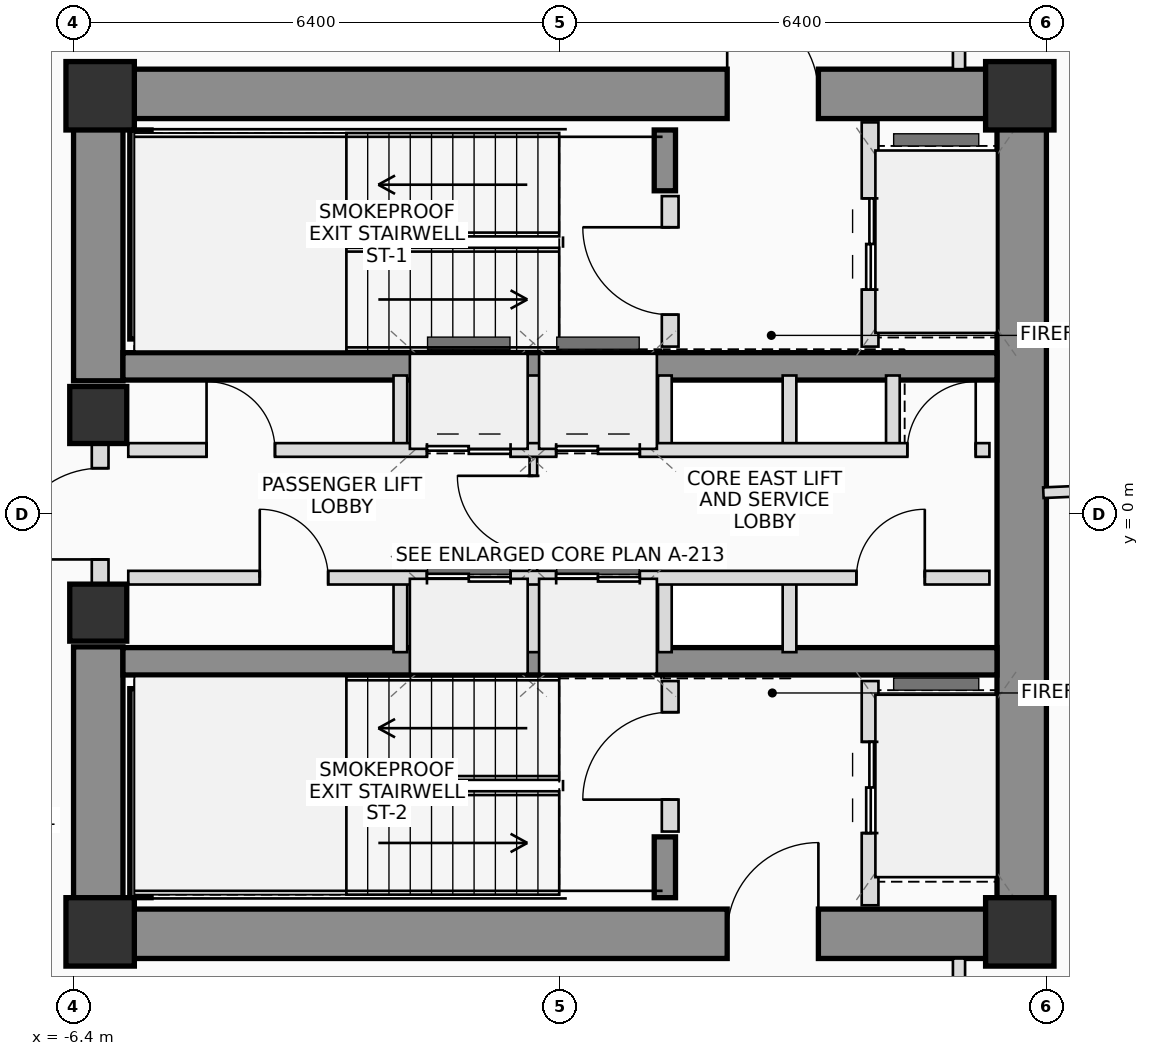
"""IFC4 building model, lengths in metres.
Left out: names, types, materials, properties, quantities, classifications, styles, units other than length and angle.
Written with IfcOpenShell. Run it as: python <this file> out.ifc"""

import sys

from ifc_helpers import new_model, si_unit, direction, frame, frame_2d, origin, origin_2d, place, context, subcontext, project, spatial, rectangle, extrude, source, transform, mapped, element, fill, save


model = new_model("IFC4")
c1 = context("Model", 3, precision=1e-05, world=origin(), true_north=direction((0.0, 1.0)))
c2 = subcontext(c1, "Body", "Model", "MODEL_VIEW")
j1 = project(units=[si_unit("LENGTHUNIT", "METRE"), si_unit("PLANEANGLEUNIT", "RADIAN")], contexts=[c1])
p1 = place(None, origin())
s1 = spatial("IfcSite", under=j1, at=p1, CompositionType="ELEMENT")
p2 = place(p1, origin())
s2 = spatial("IfcBuilding", under=s1, at=p2, CompositionType="ELEMENT")
p3 = place(p2, frame((0.0, 0.0, 139.85)))
s3 = spatial("IfcBuildingStorey", under=s2, at=p3, CompositionType="ELEMENT", Elevation=139.85)
m1 = source(origin(), c2, "Body", "SweptSolid", [
    extrude(rectangle(XDim=0.9, YDim=0.9, at=origin_2d()), origin(), (0.0, 0.0, 1.0), 3.45),
])
for number, where, z_axis, x_axis in (
    (1, (-6.05, -5.5, 0.0), (0.0, 0.0, 1.0), (1.0, 0.0, 0.0)),
    (2, (6.05, -5.5, 0.0), (0.0, 0.0, 1.0), (1.0, 0.0, 0.0)),
    (3, (6.05, 5.5, 0.0), (0.0, 0.0, 1.0), (1.0, 0.0, 0.0)),
    (4, (-6.05, 5.5, 0.0), (0.0, 0.0, 1.0), (1.0, 0.0, 0.0)),
):
    element("IfcColumn", number, at=place(p3, frame(where, z_axis=z_axis, x_axis=x_axis)), inside=s3, PredefinedType="COLUMN", context=c2, shape_type="MappedRepresentation", body=[
        mapped(m1, transform((0.0, 0.0, 0.0), scale=1.0)),
    ])
p4 = place(p3, frame((-6.4, 5.525, 0.0), z_axis=(0.0, 0.0, 1.0), x_axis=(1.0, 0.0, 0.0)))
e5 = element("IfcWall", 5, at=p4, inside=s3, PredefinedType="SHEAR", context=c2, shape_type="SweptSolid", body=[
    extrude(rectangle(XDim=12.8, YDim=0.65, at=frame_2d((6.4, 0.0))), origin(), (0.0, 0.0, 1.0), 3.45),
])
p5 = place(p4, frame((8.6, 0.0, 0.0)))
e6 = element("IfcOpeningElement", 6, at=p5, cuts=e5, PredefinedType="OPENING", context=c2, shape_type="SweptSolid", body=[
    extrude(rectangle(XDim=1.2, YDim=2.2, at=frame_2d((0.6, 1.1))), frame((0.0, 0.335, 0.0), z_axis=(0.0, -1.0, 0.0), x_axis=(1.0, 0.0, 0.0)), (0.0, 0.0, 1.0), 0.67),
])
p6 = place(p3, frame((-6.4, -5.525, 0.0), z_axis=(0.0, 0.0, 1.0), x_axis=(1.0, 0.0, 0.0)))
e7 = element("IfcWall", 7, at=p6, inside=s3, PredefinedType="SHEAR", context=c2, shape_type="SweptSolid", body=[
    extrude(rectangle(XDim=12.8, YDim=0.65, at=frame_2d((6.4, 0.0))), origin(), (0.0, 0.0, 1.0), 3.45),
])
p7 = place(p6, frame((8.6, 0.0, 0.0)))
e8 = element("IfcOpeningElement", 8, at=p7, cuts=e7, PredefinedType="OPENING", context=c2, shape_type="SweptSolid", body=[
    extrude(rectangle(XDim=1.2, YDim=2.2, at=frame_2d((0.6, 1.1))), frame((0.0, 0.335, 0.0), z_axis=(0.0, -1.0, 0.0), x_axis=(1.0, 0.0, 0.0)), (0.0, 0.0, 1.0), 0.67),
])
p8 = place(p3, frame((6.075, -5.2, 0.0), z_axis=(0.0, 0.0, 1.0), x_axis=(0.0, 1.0, 0.0)))
e9 = element("IfcWall", 9, at=p8, inside=s3, PredefinedType="SHEAR", context=c2, shape_type="SweptSolid", body=[
    extrude(rectangle(XDim=10.4, YDim=0.65, at=frame_2d((5.2, 0.0))), origin(), (0.0, 0.0, 1.0), 3.45),
])
for number, where, z_axis, x_axis in (
    (10, (-6.075, -5.2, 0.0), (0.0, 0.0, 1.0), (0.0, 1.0, 0.0)),
    (11, (-6.075, 1.75, 0.0), (0.0, 0.0, 1.0), (0.0, 1.0, 0.0)),
):
    element("IfcWall", number, at=place(p3, frame(where, z_axis=z_axis, x_axis=x_axis)), inside=s3, PredefinedType="SHEAR", context=c2, shape_type="SweptSolid", body=[
        extrude(rectangle(XDim=3.45, YDim=0.65, at=frame_2d((1.725, 0.0))), origin(), (0.0, 0.0, 1.0), 3.45),
    ])
for number, where, z_axis, x_axis in (
    (12, (-5.75, 1.94, 0.0), (0.0, 0.0, 1.0), (1.0, 0.0, 0.0)),
    (13, (-5.75, -1.94, 0.0), (0.0, 0.0, 1.0), (1.0, 0.0, 0.0)),
):
    element("IfcWall", number, at=place(p3, frame(where, z_axis=z_axis, x_axis=x_axis)), inside=s3, PredefinedType="SHEAR", context=c2, shape_type="SweptSolid", body=[
        extrude(rectangle(XDim=11.5, YDim=0.36, at=frame_2d((5.75, 0.0))), origin(), (0.0, 0.0, 1.0), 3.45),
    ])
p9 = place(p3, frame((-5.52, 2.3, 0.0), z_axis=(0.0, 0.0, 1.0), x_axis=(0.0, 1.0, 0.0)))
e14 = element("IfcWall", 14, at=p9, inside=s3, PredefinedType="SHEAR", context=c2, shape_type="SweptSolid", body=[
    extrude(rectangle(XDim=2.75, YDim=0.28, at=frame_2d((1.375, 0.0))), origin(), (0.0, 0.0, 1.0), 3.45),
])
p10 = place(p3, frame((1.38, 4.25, 0.0), z_axis=(0.0, 0.0, 1.0), x_axis=(0.0, 1.0, 0.0)))
e15 = element("IfcWall", 15, at=p10, inside=s3, PredefinedType="SHEAR", context=c2, shape_type="SweptSolid", body=[
    extrude(rectangle(XDim=0.8, YDim=0.28, at=frame_2d((0.4, 0.0))), origin(), (0.0, 0.0, 1.0), 3.45),
])
p11 = place(p3, frame((-5.52, -5.05, 0.0), z_axis=(0.0, 0.0, 1.0), x_axis=(0.0, 1.0, 0.0)))
e16 = element("IfcWall", 16, at=p11, inside=s3, PredefinedType="SHEAR", context=c2, shape_type="SweptSolid", body=[
    extrude(rectangle(XDim=2.75, YDim=0.28, at=frame_2d((1.375, 0.0))), origin(), (0.0, 0.0, 1.0), 3.45),
])
p12 = place(p3, frame((1.38, -5.05, 0.0), z_axis=(0.0, 0.0, 1.0), x_axis=(0.0, 1.0, 0.0)))
e17 = element("IfcWall", 17, at=p12, inside=s3, PredefinedType="SHEAR", context=c2, shape_type="SweptSolid", body=[
    extrude(rectangle(XDim=0.8, YDim=0.28, at=frame_2d((0.4, 0.0))), origin(), (0.0, 0.0, 1.0), 3.45),
])
m2 = source(origin(), c2, "Body", "SweptSolid", [
    extrude(rectangle(XDim=0.75, YDim=0.75, at=origin_2d()), origin(), (0.0, 0.0, 1.0), 3.45),
])
for number, where, z_axis, x_axis in (
    (18, (-6.075, -1.3, 0.0), (0.0, 0.0, 1.0), (1.0, 0.0, 0.0)),
    (19, (-6.075, 1.3, 0.0), (0.0, 0.0, 1.0), (1.0, 0.0, 0.0)),
):
    element("IfcColumn", number, at=place(p3, frame(where, z_axis=z_axis, x_axis=x_axis)), inside=s3, PredefinedType="COLUMN", context=c2, shape_type="MappedRepresentation", body=[
        mapped(m2, transform((0.0, 0.0, 0.0), scale=1.0)),
    ])
p13 = place(p3, frame((-6.05, -0.95, 0.0), z_axis=(0.0, 0.0, 1.0), x_axis=(0.0, 1.0, 0.0)))
e20 = element("IfcWall", 20, at=p13, inside=s3, PredefinedType="PLUMBINGWALL", context=c2, shape_type="SweptSolid", body=[
    extrude(rectangle(XDim=1.9, YDim=0.22, at=frame_2d((0.95, 0.0))), origin(), (0.0, 0.0, 1.0), 2.23),
])
p14 = place(p13, frame((0.35, 0.0, 0.0)))
e21 = element("IfcOpeningElement", 21, at=p14, cuts=e20, PredefinedType="OPENING", context=c2, shape_type="SweptSolid", body=[
    extrude(rectangle(XDim=1.2, YDim=2.2, at=frame_2d((0.6, 1.1))), frame((0.0, 0.12, 0.0), z_axis=(0.0, -1.0, 0.0), x_axis=(1.0, 0.0, 0.0)), (0.0, 0.0, 1.0), 0.24),
])
p15 = place(p3, frame((1.45, 2.2, 0.0), z_axis=(0.0, 0.0, 1.0), x_axis=(0.0, 1.0, 0.0)))
e22 = element("IfcWall", 22, at=p15, inside=s3, PredefinedType="PLUMBINGWALL", context=c2, shape_type="SweptSolid", body=[
    extrude(rectangle(XDim=1.98, YDim=0.22, at=frame_2d((0.99, 0.0))), origin(), (0.0, 0.0, 1.0), 3.25),
])
p16 = place(p15, frame((0.42, 0.0, 0.0)))
e23 = element("IfcOpeningElement", 23, at=p16, cuts=e22, PredefinedType="OPENING", context=c2, shape_type="SweptSolid", body=[
    extrude(rectangle(XDim=1.15, YDim=2.15, at=frame_2d((0.575, 1.075))), frame((0.0, 0.12, 0.0), z_axis=(0.0, -1.0, 0.0), x_axis=(1.0, 0.0, 0.0)), (0.0, 0.0, 1.0), 0.24),
])
p17 = place(p3, frame((4.08, 2.2, 0.0), z_axis=(0.0, 0.0, 1.0), x_axis=(0.0, 1.0, 0.0)))
e24 = element("IfcWall", 24, at=p17, inside=s3, PredefinedType="PLUMBINGWALL", context=c2, shape_type="SweptSolid", body=[
    extrude(rectangle(XDim=2.95, YDim=0.22, at=frame_2d((1.475, 0.0))), origin(), (0.0, 0.0, 1.0), 3.25),
])
p18 = place(p17, frame((0.75, 0.0, 0.0)))
e25 = element("IfcOpeningElement", 25, at=p18, cuts=e24, PredefinedType="OPENING", context=c2, shape_type="SweptSolid", body=[
    extrude(rectangle(XDim=1.2, YDim=2.25, at=frame_2d((0.6, 1.125))), frame((0.0, 0.12, 0.0), z_axis=(0.0, -1.0, 0.0), x_axis=(1.0, 0.0, 0.0)), (0.0, 0.0, 1.0), 0.24),
])
p19 = place(p3, frame((1.45, -4.18, 0.0), z_axis=(0.0, 0.0, 1.0), x_axis=(0.0, 1.0, 0.0)))
e26 = element("IfcWall", 26, at=p19, inside=s3, PredefinedType="PLUMBINGWALL", context=c2, shape_type="SweptSolid", body=[
    extrude(rectangle(XDim=1.98, YDim=0.22, at=frame_2d((0.99, 0.0))), origin(), (0.0, 0.0, 1.0), 3.25),
])
p20 = place(p19, frame((0.42, 0.0, 0.0)))
e27 = element("IfcOpeningElement", 27, at=p20, cuts=e26, PredefinedType="OPENING", context=c2, shape_type="SweptSolid", body=[
    extrude(rectangle(XDim=1.15, YDim=2.15, at=frame_2d((0.575, 1.075))), frame((0.0, 0.12, 0.0), z_axis=(0.0, -1.0, 0.0), x_axis=(1.0, 0.0, 0.0)), (0.0, 0.0, 1.0), 0.24),
])
p21 = place(p3, frame((4.08, -5.15, 0.0), z_axis=(0.0, 0.0, 1.0), x_axis=(0.0, 1.0, 0.0)))
e28 = element("IfcWall", 28, at=p21, inside=s3, PredefinedType="PLUMBINGWALL", context=c2, shape_type="SweptSolid", body=[
    extrude(rectangle(XDim=2.95, YDim=0.22, at=frame_2d((1.475, 0.0))), origin(), (0.0, 0.0, 1.0), 3.25),
])
p22 = place(p21, frame((0.95, 0.0, 0.0)))
e29 = element("IfcOpeningElement", 29, at=p22, cuts=e28, PredefinedType="OPENING", context=c2, shape_type="SweptSolid", body=[
    extrude(rectangle(XDim=1.2, YDim=2.25, at=frame_2d((0.6, 1.125))), frame((0.0, 0.12, 0.0), z_axis=(0.0, -1.0, 0.0), x_axis=(1.0, 0.0, 0.0)), (0.0, 0.0, 1.0), 0.24),
])
p23 = place(p3, frame((-0.35, -0.84, 0.0), z_axis=(0.0, 0.0, 1.0), x_axis=(0.0, 1.0, 0.0)))
e30 = element("IfcWall", 30, at=p23, inside=s3, PredefinedType="PARTITIONING", context=c2, shape_type="SweptSolid", body=[
    extrude(rectangle(XDim=1.68, YDim=0.1, at=frame_2d((0.84, 0.0))), origin(), (0.0, 0.0, 1.0), 3.25),
])
p24 = place(p23, frame((0.34, 0.0, 0.0)))
e31 = element("IfcOpeningElement", 31, at=p24, cuts=e30, PredefinedType="OPENING", context=c2, shape_type="SweptSolid", body=[
    extrude(rectangle(XDim=1.0, YDim=2.25, at=frame_2d((0.5, 1.125))), frame((0.0, 0.06, 0.0), z_axis=(0.0, -1.0, 0.0), x_axis=(1.0, 0.0, 0.0)), (0.0, 0.0, 1.0), 0.12),
])
for number, where, z_axis, x_axis in (
    (32, (-2.1, 0.84, 0.0), (0.0, 0.0, 1.0), (0.0, 1.0, 0.0)),
    (33, (-2.1, -1.82, 0.0), (0.0, 0.0, 1.0), (0.0, 1.0, 0.0)),
    (34, (-0.35, 0.84, 0.0), (0.0, 0.0, 1.0), (0.0, 1.0, 0.0)),
    (35, (-0.35, -1.82, 0.0), (0.0, 0.0, 1.0), (0.0, 1.0, 0.0)),
    (36, (1.38, 0.84, 0.0), (0.0, 0.0, 1.0), (0.0, 1.0, 0.0)),
    (37, (1.38, -1.82, 0.0), (0.0, 0.0, 1.0), (0.0, 1.0, 0.0)),
    (38, (3.02, 0.84, 0.0), (0.0, 0.0, 1.0), (0.0, 1.0, 0.0)),
    (39, (4.38, 0.84, 0.0), (0.0, 0.0, 1.0), (0.0, 1.0, 0.0)),
    (40, (3.02, -1.82, 0.0), (0.0, 0.0, 1.0), (0.0, 1.0, 0.0)),
):
    element("IfcWall", number, at=place(p3, frame(where, z_axis=z_axis, x_axis=x_axis)), inside=s3, PredefinedType="PLUMBINGWALL", context=c2, shape_type="SweptSolid", body=[
        extrude(rectangle(XDim=0.98, YDim=0.18, at=frame_2d((0.49, 0.0))), origin(), (0.0, 0.0, 1.0), 3.25),
    ])
p25 = place(p3, frame((-5.68, 0.84, 0.0), z_axis=(0.0, 0.0, 1.0), x_axis=(1.0, 0.0, 0.0)))
e41 = element("IfcWall", 41, at=p25, inside=s3, PredefinedType="PLUMBINGWALL", context=c2, shape_type="SweptSolid", body=[
    extrude(rectangle(XDim=11.33, YDim=0.18, at=frame_2d((5.665, 0.0))), origin(), (0.0, 0.0, 1.0), 3.25),
])
p26 = place(p25, frame((1.03, 0.0, 0.0)))
e42 = element("IfcOpeningElement", 42, at=p26, cuts=e41, PredefinedType="OPENING", context=c2, shape_type="SweptSolid", body=[
    extrude(rectangle(XDim=0.9, YDim=2.05, at=frame_2d((0.45, 1.025))), frame((0.0, 0.1, 0.0), z_axis=(0.0, -1.0, 0.0), x_axis=(1.0, 0.0, 0.0)), (0.0, 0.0, 1.0), 0.2),
])
p27 = place(p25, frame((3.93, 0.0, 0.0)))
e43 = element("IfcOpeningElement", 43, at=p27, cuts=e41, PredefinedType="OPENING", context=c2, shape_type="SweptSolid", body=[
    extrude(rectangle(XDim=1.1, YDim=2.2, at=frame_2d((0.55, 1.1))), frame((0.0, 0.1, 0.0), z_axis=(0.0, -1.0, 0.0), x_axis=(1.0, 0.0, 0.0)), (0.0, 0.0, 1.0), 0.2),
])
p28 = place(p25, frame((5.63, 0.0, 0.0)))
e44 = element("IfcOpeningElement", 44, at=p28, cuts=e41, PredefinedType="OPENING", context=c2, shape_type="SweptSolid", body=[
    extrude(rectangle(XDim=1.1, YDim=2.2, at=frame_2d((0.55, 1.1))), frame((0.0, 0.1, 0.0), z_axis=(0.0, -1.0, 0.0), x_axis=(1.0, 0.0, 0.0)), (0.0, 0.0, 1.0), 0.2),
])
p29 = place(p25, frame((10.25, 0.0, 0.0)))
e45 = element("IfcOpeningElement", 45, at=p29, cuts=e41, PredefinedType="OPENING", context=c2, shape_type="SweptSolid", body=[
    extrude(rectangle(XDim=0.9, YDim=2.05, at=frame_2d((0.45, 1.025))), frame((0.0, 0.1, 0.0), z_axis=(0.0, -1.0, 0.0), x_axis=(1.0, 0.0, 0.0)), (0.0, 0.0, 1.0), 0.2),
])
p30 = place(p3, frame((-5.68, -0.84, 0.0), z_axis=(0.0, 0.0, 1.0), x_axis=(1.0, 0.0, 0.0)))
e46 = element("IfcWall", 46, at=p30, inside=s3, PredefinedType="PLUMBINGWALL", context=c2, shape_type="SweptSolid", body=[
    extrude(rectangle(XDim=11.33, YDim=0.18, at=frame_2d((5.665, 0.0))), origin(), (0.0, 0.0, 1.0), 3.25),
])
p31 = place(p30, frame((1.73, 0.0, 0.0)))
e47 = element("IfcOpeningElement", 47, at=p31, cuts=e46, PredefinedType="OPENING", context=c2, shape_type="SweptSolid", body=[
    extrude(rectangle(XDim=0.9, YDim=2.05, at=frame_2d((0.45, 1.025))), frame((0.0, 0.1, 0.0), z_axis=(0.0, -1.0, 0.0), x_axis=(1.0, 0.0, 0.0)), (0.0, 0.0, 1.0), 0.2),
])
p32 = place(p30, frame((3.93, 0.0, 0.0)))
e48 = element("IfcOpeningElement", 48, at=p32, cuts=e46, PredefinedType="OPENING", context=c2, shape_type="SweptSolid", body=[
    extrude(rectangle(XDim=1.1, YDim=2.2, at=frame_2d((0.55, 1.1))), frame((0.0, 0.1, 0.0), z_axis=(0.0, -1.0, 0.0), x_axis=(1.0, 0.0, 0.0)), (0.0, 0.0, 1.0), 0.2),
])
p33 = place(p30, frame((5.63, 0.0, 0.0)))
e49 = element("IfcOpeningElement", 49, at=p33, cuts=e46, PredefinedType="OPENING", context=c2, shape_type="SweptSolid", body=[
    extrude(rectangle(XDim=1.1, YDim=2.2, at=frame_2d((0.55, 1.1))), frame((0.0, 0.1, 0.0), z_axis=(0.0, -1.0, 0.0), x_axis=(1.0, 0.0, 0.0)), (0.0, 0.0, 1.0), 0.2),
])
p34 = place(p30, frame((9.58, 0.0, 0.0)))
e50 = element("IfcOpeningElement", 50, at=p34, cuts=e46, PredefinedType="OPENING", context=c2, shape_type="SweptSolid", body=[
    extrude(rectangle(XDim=0.9, YDim=2.05, at=frame_2d((0.45, 1.025))), frame((0.0, 0.1, 0.0), z_axis=(0.0, -1.0, 0.0), x_axis=(1.0, 0.0, 0.0)), (0.0, 0.0, 1.0), 0.2),
])
p35 = place(p3, frame((5.25, 7.6, 0.0), z_axis=(0.0, 0.0, 1.0), x_axis=(0.0, -1.0, 0.0)))
e51 = element("IfcWall", 51, at=p35, inside=s3, PredefinedType="PARTITIONING", context=c2, shape_type="SweptSolid", body=[
    extrude(rectangle(XDim=1.75, YDim=0.16, at=frame_2d((0.875, 0.0))), origin(), (0.0, 0.0, 1.0), 2.605),
])
p36 = place(p3, frame((5.25, -5.85, 0.0), z_axis=(0.0, 0.0, 1.0), x_axis=(0.0, -1.0, 0.0)))
e52 = element("IfcWall", 52, at=p36, inside=s3, PredefinedType="PARTITIONING", context=c2, shape_type="SweptSolid", body=[
    extrude(rectangle(XDim=1.75, YDim=0.16, at=frame_2d((0.875, 0.0))), origin(), (0.0, 0.0, 1.0), 3.25),
])
p37 = place(p3, frame((6.36, 0.278, 0.0), z_axis=(0.0, 0.0, 1.0), x_axis=(0.999047913846, 0.043626435113, 0.0)))
e53 = element("IfcWall", 53, at=p37, inside=s3, PredefinedType="PARTITIONING", context=c2, shape_type="SweptSolid", body=[
    extrude(rectangle(XDim=9.575, YDim=0.14, at=frame_2d((4.788, 0.0))), origin(), (0.0, 0.0, 1.0), 2.605),
])
p38 = place(p5, origin())
e54 = element("IfcDoor", 54, at=p38, inside=s3, OperationType="SINGLE_SWING_LEFT", PredefinedType="DOOR", context=c2, shape_type="SweptSolid", body=[
    extrude(rectangle(XDim=1.2, YDim=2.2, at=frame_2d((0.6, 1.1))), frame((0.0, 0.025, 0.0), z_axis=(0.0, -1.0, 0.0), x_axis=(1.0, 0.0, 0.0)), (0.0, 0.0, 1.0), 0.05),
])
fill(e6, e54)
p39 = place(p7, origin())
e55 = element("IfcDoor", 55, at=p39, inside=s3, OperationType="SINGLE_SWING_RIGHT", PredefinedType="DOOR", context=c2, shape_type="SweptSolid", body=[
    extrude(rectangle(XDim=1.2, YDim=2.2, at=frame_2d((0.6, 1.1))), frame((0.0, 0.025, 0.0), z_axis=(0.0, -1.0, 0.0), x_axis=(1.0, 0.0, 0.0)), (0.0, 0.0, 1.0), 0.05),
])
fill(e8, e55)
p40 = place(p14, origin())
e56 = element("IfcDoor", 56, at=p40, inside=s3, OperationType="SINGLE_SWING_LEFT", PredefinedType="DOOR", context=c2, shape_type="SweptSolid", body=[
    extrude(rectangle(XDim=1.2, YDim=2.2, at=frame_2d((0.6, 1.1))), frame((0.0, 0.025, 0.0), z_axis=(0.0, -1.0, 0.0), x_axis=(1.0, 0.0, 0.0)), (0.0, 0.0, 1.0), 0.05),
])
fill(e21, e56)
p41 = place(p16, origin())
e57 = element("IfcDoor", 57, at=p41, inside=s3, OperationType="SINGLE_SWING_RIGHT", PredefinedType="DOOR", context=c2, shape_type="SweptSolid", body=[
    extrude(rectangle(XDim=1.15, YDim=2.15, at=frame_2d((0.575, 1.075))), frame((0.0, 0.025, 0.0), z_axis=(0.0, -1.0, 0.0), x_axis=(1.0, 0.0, 0.0)), (0.0, 0.0, 1.0), 0.05),
])
fill(e23, e57)
p42 = place(p18, origin())
e58 = element("IfcDoor", 58, at=p42, inside=s3, OperationType="DOUBLE_DOOR_SLIDING", PredefinedType="DOOR", context=c2, shape_type="SweptSolid", body=[
    extrude(rectangle(XDim=1.2, YDim=2.25, at=frame_2d((0.6, 1.125))), frame((0.0, 0.025, 0.0), z_axis=(0.0, -1.0, 0.0), x_axis=(1.0, 0.0, 0.0)), (0.0, 0.0, 1.0), 0.05),
])
fill(e25, e58)
p43 = place(p20, origin())
e59 = element("IfcDoor", 59, at=p43, inside=s3, OperationType="SINGLE_SWING_LEFT", PredefinedType="DOOR", context=c2, shape_type="SweptSolid", body=[
    extrude(rectangle(XDim=1.15, YDim=2.15, at=frame_2d((0.575, 1.075))), frame((0.0, 0.025, 0.0), z_axis=(0.0, -1.0, 0.0), x_axis=(1.0, 0.0, 0.0)), (0.0, 0.0, 1.0), 0.05),
])
fill(e27, e59)
p44 = place(p22, origin())
e60 = element("IfcDoor", 60, at=p44, inside=s3, OperationType="DOUBLE_DOOR_SLIDING", PredefinedType="DOOR", context=c2, shape_type="SweptSolid", body=[
    extrude(rectangle(XDim=1.2, YDim=2.25, at=frame_2d((0.6, 1.125))), frame((0.0, 0.025, 0.0), z_axis=(0.0, -1.0, 0.0), x_axis=(1.0, 0.0, 0.0)), (0.0, 0.0, 1.0), 0.05),
])
fill(e29, e60)
p45 = place(p24, origin())
e61 = element("IfcDoor", 61, at=p45, inside=s3, OperationType="SINGLE_SWING_RIGHT", PredefinedType="DOOR", context=c2, shape_type="SweptSolid", body=[
    extrude(rectangle(XDim=1.0, YDim=2.25, at=frame_2d((0.5, 1.125))), frame((0.0, 0.025, 0.0), z_axis=(0.0, -1.0, 0.0), x_axis=(1.0, 0.0, 0.0)), (0.0, 0.0, 1.0), 0.05),
])
fill(e31, e61)
p46 = place(p26, origin())
e62 = element("IfcDoor", 62, at=p46, inside=s3, OperationType="SINGLE_SWING_LEFT", PredefinedType="DOOR", context=c2, shape_type="SweptSolid", body=[
    extrude(rectangle(XDim=0.9, YDim=2.05, at=frame_2d((0.45, 1.025))), frame((0.0, 0.025, 0.0), z_axis=(0.0, -1.0, 0.0), x_axis=(1.0, 0.0, 0.0)), (0.0, 0.0, 1.0), 0.05),
])
fill(e42, e62)
p47 = place(p27, origin())
e63 = element("IfcDoor", 63, at=p47, inside=s3, OperationType="DOUBLE_DOOR_SLIDING", PredefinedType="DOOR", context=c2, shape_type="SweptSolid", body=[
    extrude(rectangle(XDim=1.1, YDim=2.2, at=frame_2d((0.55, 1.1))), frame((0.0, 0.025, 0.0), z_axis=(0.0, -1.0, 0.0), x_axis=(1.0, 0.0, 0.0)), (0.0, 0.0, 1.0), 0.05),
])
fill(e43, e63)
p48 = place(p28, origin())
e64 = element("IfcDoor", 64, at=p48, inside=s3, OperationType="DOUBLE_DOOR_SLIDING", PredefinedType="DOOR", context=c2, shape_type="SweptSolid", body=[
    extrude(rectangle(XDim=1.1, YDim=2.2, at=frame_2d((0.55, 1.1))), frame((0.0, 0.025, 0.0), z_axis=(0.0, -1.0, 0.0), x_axis=(1.0, 0.0, 0.0)), (0.0, 0.0, 1.0), 0.05),
])
fill(e44, e64)
p49 = place(p29, origin())
e65 = element("IfcDoor", 65, at=p49, inside=s3, OperationType="SINGLE_SWING_RIGHT", PredefinedType="DOOR", context=c2, shape_type="SweptSolid", body=[
    extrude(rectangle(XDim=0.9, YDim=2.05, at=frame_2d((0.45, 1.025))), frame((0.0, 0.025, 0.0), z_axis=(0.0, -1.0, 0.0), x_axis=(1.0, 0.0, 0.0)), (0.0, 0.0, 1.0), 0.05),
])
fill(e45, e65)
p50 = place(p31, origin())
e66 = element("IfcDoor", 66, at=p50, inside=s3, OperationType="SINGLE_SWING_LEFT", PredefinedType="DOOR", context=c2, shape_type="SweptSolid", body=[
    extrude(rectangle(XDim=0.9, YDim=2.05, at=frame_2d((0.45, 1.025))), frame((0.0, 0.025, 0.0), z_axis=(0.0, -1.0, 0.0), x_axis=(1.0, 0.0, 0.0)), (0.0, 0.0, 1.0), 0.05),
])
fill(e47, e66)
p51 = place(p32, origin())
e67 = element("IfcDoor", 67, at=p51, inside=s3, OperationType="DOUBLE_DOOR_SLIDING", PredefinedType="DOOR", context=c2, shape_type="SweptSolid", body=[
    extrude(rectangle(XDim=1.1, YDim=2.2, at=frame_2d((0.55, 1.1))), frame((0.0, 0.025, 0.0), z_axis=(0.0, -1.0, 0.0), x_axis=(1.0, 0.0, 0.0)), (0.0, 0.0, 1.0), 0.05),
])
fill(e48, e67)
p52 = place(p33, origin())
e68 = element("IfcDoor", 68, at=p52, inside=s3, OperationType="DOUBLE_DOOR_SLIDING", PredefinedType="DOOR", context=c2, shape_type="SweptSolid", body=[
    extrude(rectangle(XDim=1.1, YDim=2.2, at=frame_2d((0.55, 1.1))), frame((0.0, 0.025, 0.0), z_axis=(0.0, -1.0, 0.0), x_axis=(1.0, 0.0, 0.0)), (0.0, 0.0, 1.0), 0.05),
])
fill(e49, e68)
p53 = place(p34, origin())
e69 = element("IfcDoor", 69, at=p53, inside=s3, OperationType="SINGLE_SWING_RIGHT", PredefinedType="DOOR", context=c2, shape_type="SweptSolid", body=[
    extrude(rectangle(XDim=0.9, YDim=2.05, at=frame_2d((0.45, 1.025))), frame((0.0, 0.025, 0.0), z_axis=(0.0, -1.0, 0.0), x_axis=(1.0, 0.0, 0.0)), (0.0, 0.0, 1.0), 0.05),
])
fill(e50, e69)
save(model, sys.argv[1])
